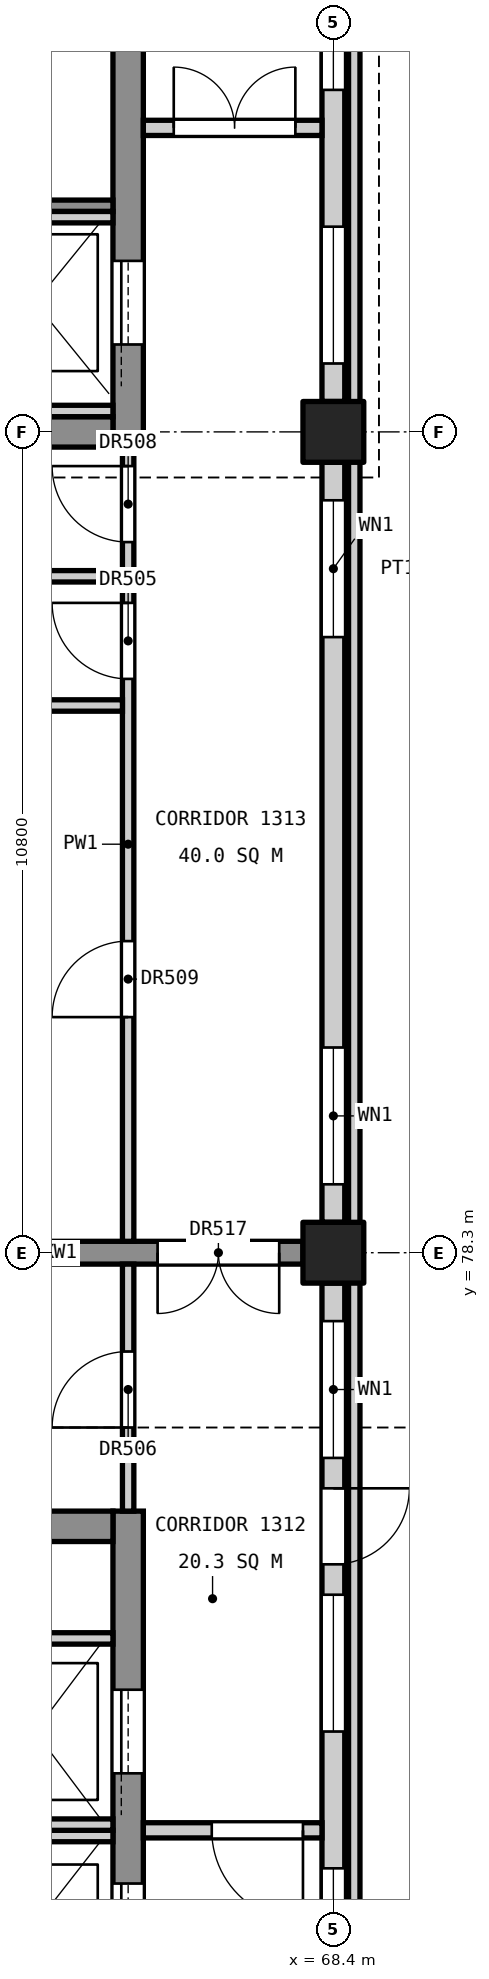
"""IFC4 building model, lengths in metres.
Left out: names, types, materials, properties, quantities, classifications, styles, units other than length and angle.
Written with IfcOpenShell. Run it as: python <this file> out.ifc"""

import sys

from ifc_helpers import new_model, si_unit, direction, frame, frame_2d, origin, origin_2d, place, context, subcontext, project, spatial, rectangle, extrude, element, fill, save


model = new_model("IFC4")
c1 = context("Model", 3, precision=1e-05, world=origin(), true_north=direction((0.0, 1.0)))
c2 = subcontext(c1, "Body", "Model", "MODEL_VIEW")
j1 = project(units=[si_unit("LENGTHUNIT", "METRE"), si_unit("PLANEANGLEUNIT", "RADIAN")], contexts=[c1])
p1 = place(None, origin())
s1 = spatial("IfcSite", under=j1, at=p1, CompositionType="ELEMENT")
p2 = place(p1, origin())
s2 = spatial("IfcBuilding", under=s1, at=p2, CompositionType="ELEMENT")
p3 = place(p2, frame((0.0, 0.0, 65.4)))
s3 = spatial("IfcBuildingStorey", under=s2, at=p3, CompositionType="ELEMENT", Elevation=65.4)
for number, where, z_axis, x_axis in (
    (1, (68.4, 78.3, 0.0), (0.0, 0.0, 1.0), (1.0, 0.0, 0.0)),
    (2, (68.4, 89.1, 0.0), (0.0, 0.0, 1.0), (1.0, 0.0, 0.0)),
):
    element("IfcColumn", number, at=place(p3, frame(where, z_axis=z_axis, x_axis=x_axis)), inside=s3, PredefinedType="COLUMN", context=c2, shape_type="SweptSolid", body=[
        extrude(rectangle(XDim=0.8, YDim=0.8, at=origin_2d()), origin(), (0.0, 0.0, 1.0), 4.8),
    ])
p4 = place(p3, frame((65.7, 60.1, 0.0), z_axis=(0.0, 0.0, 1.0), x_axis=(0.0, 1.0, 0.0)))
e3 = element("IfcWall", 3, at=p4, inside=s3, PredefinedType="SHEAR", context=c2, shape_type="SweptSolid", body=[
    extrude(rectangle(XDim=14.8, YDim=0.4, at=frame_2d((7.4, 0.0))), origin(), (0.0, 0.0, 1.0), 4.55),
])
p5 = place(p4, frame((0.5, 0.0, 0.0)))
e4 = element("IfcOpeningElement", 4, at=p5, cuts=e3, PredefinedType="OPENING", context=c2, shape_type="SweptSolid", body=[
    extrude(rectangle(XDim=1.4, YDim=2.1, at=frame_2d((0.7, 1.05))), frame((0.0, 0.21, 0.0), z_axis=(0.0, -1.0, 0.0), x_axis=(1.0, 0.0, 0.0)), (0.0, 0.0, 1.0), 0.42),
])
p6 = place(p4, frame((8.8, 0.0, 0.0)))
e5 = element("IfcOpeningElement", 5, at=p6, cuts=e3, PredefinedType="OPENING", context=c2, shape_type="SweptSolid", body=[
    extrude(rectangle(XDim=1.1, YDim=2.1, at=frame_2d((0.55, 1.05))), frame((0.0, 0.21, 0.0), z_axis=(0.0, -1.0, 0.0), x_axis=(1.0, 0.0, 0.0)), (0.0, 0.0, 1.0), 0.42),
])
p7 = place(p4, frame((11.35, 0.0, 0.0)))
e6 = element("IfcOpeningElement", 6, at=p7, cuts=e3, PredefinedType="OPENING", context=c2, shape_type="SweptSolid", body=[
    extrude(rectangle(XDim=1.1, YDim=2.1, at=frame_2d((0.55, 1.05))), frame((0.0, 0.21, 0.0), z_axis=(0.0, -1.0, 0.0), x_axis=(1.0, 0.0, 0.0)), (0.0, 0.0, 1.0), 0.42),
])
p8 = place(p3, frame((61.4, 74.7, 0.0), z_axis=(0.0, 0.0, 1.0), x_axis=(1.0, 0.0, 0.0)))
e7 = element("IfcWall", 7, at=p8, inside=s3, PredefinedType="SHEAR", context=c2, shape_type="SweptSolid", body=[
    extrude(rectangle(XDim=4.1, YDim=0.4, at=frame_2d((2.05, 0.0))), origin(), (0.0, 0.0, 1.0), 4.55),
])
p9 = place(p3, frame((65.7, 88.9, 0.0), z_axis=(0.0, 0.0, 1.0), x_axis=(0.0, 1.0, 0.0)))
e8 = element("IfcWall", 8, at=p9, inside=s3, PredefinedType="SHEAR", context=c2, shape_type="SweptSolid", body=[
    extrude(rectangle(XDim=11.2, YDim=0.4, at=frame_2d((5.6, 0.0))), origin(), (0.0, 0.0, 1.0), 4.55),
])
p10 = place(p9, frame((9.3, 0.0, 0.0)))
e9 = element("IfcOpeningElement", 9, at=p10, cuts=e8, PredefinedType="OPENING", context=c2, shape_type="SweptSolid", body=[
    extrude(rectangle(XDim=1.4, YDim=2.1, at=frame_2d((0.7, 1.05))), frame((0.0, 0.21, 0.0), z_axis=(0.0, -1.0, 0.0), x_axis=(1.0, 0.0, 0.0)), (0.0, 0.0, 1.0), 0.42),
])
p11 = place(p9, frame((1.35, 0.0, 0.0)))
e10 = element("IfcOpeningElement", 10, at=p11, cuts=e8, PredefinedType="OPENING", context=c2, shape_type="SweptSolid", body=[
    extrude(rectangle(XDim=1.1, YDim=2.1, at=frame_2d((0.55, 1.05))), frame((0.0, 0.21, 0.0), z_axis=(0.0, -1.0, 0.0), x_axis=(1.0, 0.0, 0.0)), (0.0, 0.0, 1.0), 0.42),
])
p12 = place(p3, frame((61.4, 89.1, 0.0), z_axis=(0.0, 0.0, 1.0), x_axis=(1.0, 0.0, 0.0)))
e11 = element("IfcWall", 11, at=p12, inside=s3, PredefinedType="SHEAR", context=c2, shape_type="SweptSolid", body=[
    extrude(rectangle(XDim=4.1, YDim=0.4, at=frame_2d((2.05, 0.0))), origin(), (0.0, 0.0, 1.0), 4.55),
])
p13 = place(p3, frame((61.6, 78.3, 0.0), z_axis=(0.0, 0.0, 1.0), x_axis=(1.0, 0.0, 0.0)))
e12 = element("IfcWall", 12, at=p13, inside=s3, PredefinedType="SHEAR", context=c2, shape_type="SweptSolid", body=[
    extrude(rectangle(XDim=6.4, YDim=0.3, at=frame_2d((3.2, 0.0))), origin(), (0.0, 0.0, 1.0), 4.55),
])
p14 = place(p13, frame((4.488, 0.0, 0.0)))
e13 = element("IfcOpeningElement", 13, at=p14, cuts=e12, PredefinedType="OPENING", context=c2, shape_type="SweptSolid", body=[
    extrude(rectangle(XDim=1.6, YDim=2.1, at=frame_2d((0.8, 1.05))), frame((0.0, 0.16, 0.0), z_axis=(0.0, -1.0, 0.0), x_axis=(1.0, 0.0, 0.0)), (0.0, 0.0, 1.0), 0.32),
])
p15 = place(p3, frame((61.4, 92.075, 0.0), z_axis=(0.0, 0.0, 1.0), x_axis=(1.0, 0.0, 0.0)))
e14 = element("IfcWall", 14, at=p15, inside=s3, PredefinedType="SOLIDWALL", context=c2, shape_type="SweptSolid", body=[
    extrude(rectangle(XDim=4.1, YDim=0.15, at=frame_2d((2.05, 0.0))), origin(), (0.0, 0.0, 1.0), 4.55),
])
for number, where, z_axis, x_axis in (
    (15, (63.65, 70.625, 0.0), (0.0, 0.0, 1.0), (1.0, 0.0, 0.0)),
    (16, (63.65, 70.775, 0.0), (0.0, 0.0, 1.0), (1.0, 0.0, 0.0)),
    (17, (63.65, 73.225, 0.0), (0.0, 0.0, 1.0), (1.0, 0.0, 0.0)),
    (18, (63.65, 91.925, 0.0), (0.0, 0.0, 1.0), (1.0, 0.0, 0.0)),
    (19, (63.65, 89.375, 0.0), (0.0, 0.0, 1.0), (1.0, 0.0, 0.0)),
):
    element("IfcWall", number, at=place(p3, frame(where, z_axis=z_axis, x_axis=x_axis)), inside=s3, PredefinedType="SOLIDWALL", context=c2, shape_type="SweptSolid", body=[
        extrude(rectangle(XDim=1.85, YDim=0.15, at=frame_2d((0.925, 0.0))), origin(), (0.0, 0.0, 1.0), 4.8),
    ])
p16 = place(p3, frame((68.675, 35.05, 0.0), z_axis=(0.0, 0.0, 1.0), x_axis=(0.0, 1.0, 0.0)))
e20 = element("IfcWall", 20, at=p16, inside=s3, PredefinedType="PARAPET", context=c2, shape_type="SweptSolid", body=[
    extrude(rectangle(XDim=64.9, YDim=0.15, at=frame_2d((32.45, 0.0))), origin(), (0.0, 0.0, 1.0), 0.3),
])
p17 = place(p3, frame((68.4, 67.9, 0.0), z_axis=(0.0, 0.0, 1.0), x_axis=(0.0, 1.0, 0.0)))
e21 = element("IfcWall", 21, at=p17, inside=s3, PredefinedType="STANDARD", context=c2, shape_type="SweptSolid", body=[
    extrude(rectangle(XDim=10.0, YDim=0.3, at=frame_2d((5.0, 0.0))), origin(), (0.0, 0.0, 1.0), 3.55),
])
p18 = place(p17, frame((0.5, 0.0, 0.9)))
e22 = element("IfcOpeningElement", 22, at=p18, cuts=e21, PredefinedType="OPENING", context=c2, shape_type="SweptSolid", body=[
    extrude(rectangle(XDim=1.8, YDim=2.4, at=frame_2d((0.9, 1.2))), frame((0.0, 0.16, 0.0), z_axis=(0.0, -1.0, 0.0), x_axis=(1.0, 0.0, 0.0)), (0.0, 0.0, 1.0), 0.32),
])
p19 = place(p17, frame((4.1, 0.0, 0.9)))
e23 = element("IfcOpeningElement", 23, at=p19, cuts=e21, PredefinedType="OPENING", context=c2, shape_type="SweptSolid", body=[
    extrude(rectangle(XDim=1.8, YDim=2.4, at=frame_2d((0.9, 1.2))), frame((0.0, 0.16, 0.0), z_axis=(0.0, -1.0, 0.0), x_axis=(1.0, 0.0, 0.0)), (0.0, 0.0, 1.0), 0.32),
])
p20 = place(p17, frame((7.7, 0.0, 0.9)))
e24 = element("IfcOpeningElement", 24, at=p20, cuts=e21, PredefinedType="OPENING", context=c2, shape_type="SweptSolid", body=[
    extrude(rectangle(XDim=1.8, YDim=2.4, at=frame_2d((0.9, 1.2))), frame((0.0, 0.16, 0.0), z_axis=(0.0, -1.0, 0.0), x_axis=(1.0, 0.0, 0.0)), (0.0, 0.0, 1.0), 0.32),
])
p21 = place(p17, frame((6.3, 0.0, 0.0)))
e25 = element("IfcOpeningElement", 25, at=p21, cuts=e21, PredefinedType="OPENING", context=c2, shape_type="SweptSolid", body=[
    extrude(rectangle(XDim=1.0, YDim=2.1, at=frame_2d((0.5, 1.05))), frame((0.0, 0.16, 0.0), z_axis=(0.0, -1.0, 0.0), x_axis=(1.0, 0.0, 0.0)), (0.0, 0.0, 1.0), 0.32),
])
p22 = place(p3, frame((68.4, 78.7, 0.0), z_axis=(0.0, 0.0, 1.0), x_axis=(0.0, 1.0, 0.0)))
e26 = element("IfcWall", 26, at=p22, inside=s3, PredefinedType="STANDARD", context=c2, shape_type="SweptSolid", body=[
    extrude(rectangle(XDim=10.0, YDim=0.3, at=frame_2d((5.0, 0.0))), origin(), (0.0, 0.0, 1.0), 3.55),
])
p23 = place(p22, frame((0.5, 0.0, 0.9)))
e27 = element("IfcOpeningElement", 27, at=p23, cuts=e26, PredefinedType="OPENING", context=c2, shape_type="SweptSolid", body=[
    extrude(rectangle(XDim=1.8, YDim=2.4, at=frame_2d((0.9, 1.2))), frame((0.0, 0.16, 0.0), z_axis=(0.0, -1.0, 0.0), x_axis=(1.0, 0.0, 0.0)), (0.0, 0.0, 1.0), 0.32),
])
p24 = place(p22, frame((7.7, 0.0, 0.9)))
e28 = element("IfcOpeningElement", 28, at=p24, cuts=e26, PredefinedType="OPENING", context=c2, shape_type="SweptSolid", body=[
    extrude(rectangle(XDim=1.8, YDim=2.4, at=frame_2d((0.9, 1.2))), frame((0.0, 0.16, 0.0), z_axis=(0.0, -1.0, 0.0), x_axis=(1.0, 0.0, 0.0)), (0.0, 0.0, 1.0), 0.32),
])
p25 = place(p3, frame((68.4, 89.5, 0.0), z_axis=(0.0, 0.0, 1.0), x_axis=(0.0, 1.0, 0.0)))
e29 = element("IfcWall", 29, at=p25, inside=s3, PredefinedType="STANDARD", context=c2, shape_type="SweptSolid", body=[
    extrude(rectangle(XDim=10.0, YDim=0.3, at=frame_2d((5.0, 0.0))), origin(), (0.0, 0.0, 1.0), 3.55),
])
p26 = place(p25, frame((0.5, 0.0, 0.9)))
e30 = element("IfcOpeningElement", 30, at=p26, cuts=e29, PredefinedType="OPENING", context=c2, shape_type="SweptSolid", body=[
    extrude(rectangle(XDim=1.8, YDim=2.4, at=frame_2d((0.9, 1.2))), frame((0.0, 0.16, 0.0), z_axis=(0.0, -1.0, 0.0), x_axis=(1.0, 0.0, 0.0)), (0.0, 0.0, 1.0), 0.32),
])
p27 = place(p25, frame((4.1, 0.0, 0.9)))
e31 = element("IfcOpeningElement", 31, at=p27, cuts=e29, PredefinedType="OPENING", context=c2, shape_type="SweptSolid", body=[
    extrude(rectangle(XDim=1.8, YDim=2.4, at=frame_2d((0.9, 1.2))), frame((0.0, 0.16, 0.0), z_axis=(0.0, -1.0, 0.0), x_axis=(1.0, 0.0, 0.0)), (0.0, 0.0, 1.0), 0.32),
])
p28 = place(p25, frame((7.7, 0.0, 0.9)))
e32 = element("IfcOpeningElement", 32, at=p28, cuts=e29, PredefinedType="OPENING", context=c2, shape_type="SweptSolid", body=[
    extrude(rectangle(XDim=1.8, YDim=2.4, at=frame_2d((0.9, 1.2))), frame((0.0, 0.16, 0.0), z_axis=(0.0, -1.0, 0.0), x_axis=(1.0, 0.0, 0.0)), (0.0, 0.0, 1.0), 0.32),
])
p29 = place(p3, frame((65.7, 74.9, 0.0), z_axis=(0.0, 0.0, 1.0), x_axis=(0.0, 1.0, 0.0)))
e33 = element("IfcWall", 33, at=p29, inside=s3, PredefinedType="PARTITIONING", context=c2, shape_type="SweptSolid", body=[
    extrude(rectangle(XDim=3.25, YDim=0.15, at=frame_2d((1.625, 0.0))), origin(), (0.0, 0.0, 1.0), 3.55),
])
p30 = place(p29, frame((1.1, 0.0, 0.0)))
e34 = element("IfcOpeningElement", 34, at=p30, cuts=e33, PredefinedType="OPENING", context=c2, shape_type="SweptSolid", body=[
    extrude(rectangle(XDim=1.0, YDim=2.1, at=frame_2d((0.5, 1.05))), frame((0.0, 0.085, 0.0), z_axis=(0.0, -1.0, 0.0), x_axis=(1.0, 0.0, 0.0)), (0.0, 0.0, 1.0), 0.17),
])
p31 = place(p3, frame((65.7, 78.45, 0.0), z_axis=(0.0, 0.0, 1.0), x_axis=(0.0, 1.0, 0.0)))
e35 = element("IfcWall", 35, at=p31, inside=s3, PredefinedType="PARTITIONING", context=c2, shape_type="SweptSolid", body=[
    extrude(rectangle(XDim=10.45, YDim=0.15, at=frame_2d((5.225, 0.0))), origin(), (0.0, 0.0, 1.0), 3.55),
])
p32 = place(p31, frame((7.4, 0.0, 0.0)))
e36 = element("IfcOpeningElement", 36, at=p32, cuts=e35, PredefinedType="OPENING", context=c2, shape_type="SweptSolid", body=[
    extrude(rectangle(XDim=1.0, YDim=2.1, at=frame_2d((0.5, 1.05))), frame((0.0, 0.085, 0.0), z_axis=(0.0, -1.0, 0.0), x_axis=(1.0, 0.0, 0.0)), (0.0, 0.0, 1.0), 0.17),
])
p33 = place(p31, frame((9.2, 0.0, 0.0)))
e37 = element("IfcOpeningElement", 37, at=p33, cuts=e35, PredefinedType="OPENING", context=c2, shape_type="SweptSolid", body=[
    extrude(rectangle(XDim=1.0, YDim=2.1, at=frame_2d((0.5, 1.05))), frame((0.0, 0.085, 0.0), z_axis=(0.0, -1.0, 0.0), x_axis=(1.0, 0.0, 0.0)), (0.0, 0.0, 1.0), 0.17),
])
p34 = place(p31, frame((2.95, 0.0, 0.0)))
e38 = element("IfcOpeningElement", 38, at=p34, cuts=e35, PredefinedType="OPENING", context=c2, shape_type="SweptSolid", body=[
    extrude(rectangle(XDim=1.0, YDim=2.1, at=frame_2d((0.5, 1.05))), frame((0.0, 0.085, 0.0), z_axis=(0.0, -1.0, 0.0), x_axis=(1.0, 0.0, 0.0)), (0.0, 0.0, 1.0), 0.17),
])
p35 = place(p3, frame((61.35, 85.5, 0.0), z_axis=(0.0, 0.0, 1.0), x_axis=(1.0, 0.0, 0.0)))
e39 = element("IfcWall", 39, at=p35, inside=s3, PredefinedType="PARTITIONING", context=c2, shape_type="SweptSolid", body=[
    extrude(rectangle(XDim=4.275, YDim=0.15, at=frame_2d((2.137, 0.0))), origin(), (0.0, 0.0, 1.0), 3.85),
])
p36 = place(p3, frame((61.35, 87.2, 0.0), z_axis=(0.0, 0.0, 1.0), x_axis=(1.0, 0.0, 0.0)))
e40 = element("IfcWall", 40, at=p36, inside=s3, PredefinedType="PARTITIONING", context=c2, shape_type="SweptSolid", body=[
    extrude(rectangle(XDim=4.275, YDim=0.15, at=frame_2d((2.137, 0.0))), origin(), (0.0, 0.0, 1.0), 3.55),
])
p37 = place(p3, frame((65.9, 93.1, 0.0), z_axis=(0.0, 0.0, 1.0), x_axis=(1.0, 0.0, 0.0)))
e41 = element("IfcWall", 41, at=p37, inside=s3, PredefinedType="PARTITIONING", context=c2, shape_type="SweptSolid", body=[
    extrude(rectangle(XDim=2.35, YDim=0.2, at=frame_2d((1.175, 0.0))), origin(), (0.0, 0.0, 1.0), 3.55),
])
p38 = place(p37, frame((0.4, 0.0, 0.0)))
e42 = element("IfcOpeningElement", 42, at=p38, cuts=e41, PredefinedType="OPENING", context=c2, shape_type="SweptSolid", body=[
    extrude(rectangle(XDim=1.6, YDim=2.1, at=frame_2d((0.8, 1.05))), frame((0.0, 0.11, 0.0), z_axis=(0.0, -1.0, 0.0), x_axis=(1.0, 0.0, 0.0)), (0.0, 0.0, 1.0), 0.22),
])
p39 = place(p3, frame((65.9, 70.7, 0.0), z_axis=(0.0, 0.0, 1.0), x_axis=(1.0, 0.0, 0.0)))
e43 = element("IfcWall", 43, at=p39, inside=s3, PredefinedType="PARTITIONING", context=c2, shape_type="SweptSolid", body=[
    extrude(rectangle(XDim=2.35, YDim=0.2, at=frame_2d((1.175, 0.0))), origin(), (0.0, 0.0, 1.0), 3.55),
])
p40 = place(p39, frame((0.9, 0.0, 0.0)))
e44 = element("IfcOpeningElement", 44, at=p40, cuts=e43, PredefinedType="OPENING", context=c2, shape_type="SweptSolid", body=[
    extrude(rectangle(XDim=1.2, YDim=2.1, at=frame_2d((0.6, 1.05))), frame((0.0, 0.11, 0.0), z_axis=(0.0, -1.0, 0.0), x_axis=(1.0, 0.0, 0.0)), (0.0, 0.0, 1.0), 0.22),
])
p41 = place(p6, origin())
e45 = element("IfcDoor", 45, at=p41, inside=s3, OperationType="SLIDING_TO_LEFT", PredefinedType="DOOR", context=c2, shape_type="SweptSolid", body=[
    extrude(rectangle(XDim=1.1, YDim=2.1, at=frame_2d((0.55, 1.05))), frame((0.0, 0.025, 0.0), z_axis=(0.0, -1.0, 0.0), x_axis=(1.0, 0.0, 0.0)), (0.0, 0.0, 1.0), 0.05),
])
fill(e5, e45)
p42 = place(p7, origin())
e46 = element("IfcDoor", 46, at=p42, inside=s3, OperationType="SLIDING_TO_LEFT", PredefinedType="DOOR", context=c2, shape_type="SweptSolid", body=[
    extrude(rectangle(XDim=1.1, YDim=2.1, at=frame_2d((0.55, 1.05))), frame((0.0, 0.025, 0.0), z_axis=(0.0, -1.0, 0.0), x_axis=(1.0, 0.0, 0.0)), (0.0, 0.0, 1.0), 0.05),
])
fill(e6, e46)
p43 = place(p11, origin())
e47 = element("IfcDoor", 47, at=p43, inside=s3, OperationType="SLIDING_TO_LEFT", PredefinedType="DOOR", context=c2, shape_type="SweptSolid", body=[
    extrude(rectangle(XDim=1.1, YDim=2.1, at=frame_2d((0.55, 1.05))), frame((0.0, 0.025, 0.0), z_axis=(0.0, -1.0, 0.0), x_axis=(1.0, 0.0, 0.0)), (0.0, 0.0, 1.0), 0.05),
])
fill(e10, e47)
p44 = place(p18, origin())
e48 = element("IfcWindow", 48, at=p44, inside=s3, PartitioningType="SINGLE_PANEL", PredefinedType="WINDOW", context=c2, shape_type="SweptSolid", body=[
    extrude(rectangle(XDim=1.8, YDim=2.4, at=frame_2d((0.9, 1.2))), frame((0.0, 0.03, 0.0), z_axis=(0.0, -1.0, 0.0), x_axis=(1.0, 0.0, 0.0)), (0.0, 0.0, 1.0), 0.06),
])
fill(e22, e48)
p45 = place(p19, origin())
e49 = element("IfcWindow", 49, at=p45, inside=s3, PartitioningType="SINGLE_PANEL", PredefinedType="WINDOW", context=c2, shape_type="SweptSolid", body=[
    extrude(rectangle(XDim=1.8, YDim=2.4, at=frame_2d((0.9, 1.2))), frame((0.0, 0.03, 0.0), z_axis=(0.0, -1.0, 0.0), x_axis=(1.0, 0.0, 0.0)), (0.0, 0.0, 1.0), 0.06),
])
fill(e23, e49)
p46 = place(p20, origin())
e50 = element("IfcWindow", 50, at=p46, inside=s3, PartitioningType="SINGLE_PANEL", PredefinedType="WINDOW", context=c2, shape_type="SweptSolid", body=[
    extrude(rectangle(XDim=1.8, YDim=2.4, at=frame_2d((0.9, 1.2))), frame((0.0, 0.03, 0.0), z_axis=(0.0, -1.0, 0.0), x_axis=(1.0, 0.0, 0.0)), (0.0, 0.0, 1.0), 0.06),
])
fill(e24, e50)
p47 = place(p23, origin())
e51 = element("IfcWindow", 51, at=p47, inside=s3, PartitioningType="SINGLE_PANEL", PredefinedType="WINDOW", context=c2, shape_type="SweptSolid", body=[
    extrude(rectangle(XDim=1.8, YDim=2.4, at=frame_2d((0.9, 1.2))), frame((0.0, 0.03, 0.0), z_axis=(0.0, -1.0, 0.0), x_axis=(1.0, 0.0, 0.0)), (0.0, 0.0, 1.0), 0.06),
])
fill(e27, e51)
p48 = place(p24, origin())
e52 = element("IfcWindow", 52, at=p48, inside=s3, PartitioningType="SINGLE_PANEL", PredefinedType="WINDOW", context=c2, shape_type="SweptSolid", body=[
    extrude(rectangle(XDim=1.8, YDim=2.4, at=frame_2d((0.9, 1.2))), frame((0.0, 0.03, 0.0), z_axis=(0.0, -1.0, 0.0), x_axis=(1.0, 0.0, 0.0)), (0.0, 0.0, 1.0), 0.06),
])
fill(e28, e52)
p49 = place(p26, origin())
e53 = element("IfcWindow", 53, at=p49, inside=s3, PartitioningType="SINGLE_PANEL", PredefinedType="WINDOW", context=c2, shape_type="SweptSolid", body=[
    extrude(rectangle(XDim=1.8, YDim=2.4, at=frame_2d((0.9, 1.2))), frame((0.0, 0.03, 0.0), z_axis=(0.0, -1.0, 0.0), x_axis=(1.0, 0.0, 0.0)), (0.0, 0.0, 1.0), 0.06),
])
fill(e30, e53)
p50 = place(p27, origin())
e54 = element("IfcWindow", 54, at=p50, inside=s3, PartitioningType="SINGLE_PANEL", PredefinedType="WINDOW", context=c2, shape_type="SweptSolid", body=[
    extrude(rectangle(XDim=1.8, YDim=2.4, at=frame_2d((0.9, 1.2))), frame((0.0, 0.03, 0.0), z_axis=(0.0, -1.0, 0.0), x_axis=(1.0, 0.0, 0.0)), (0.0, 0.0, 1.0), 0.06),
])
fill(e31, e54)
p51 = place(p21, frame((1.0, 0.0, 0.0), z_axis=(0.0, 0.0, 1.0), x_axis=(-1.0, 0.0, 0.0)))
e55 = element("IfcDoor", 55, at=p51, inside=s3, OperationType="SINGLE_SWING_LEFT", PredefinedType="DOOR", context=c2, shape_type="SweptSolid", body=[
    extrude(rectangle(XDim=1.0, YDim=2.1, at=frame_2d((0.5, 1.05))), frame((0.0, 0.025, 0.0), z_axis=(0.0, -1.0, 0.0), x_axis=(1.0, 0.0, 0.0)), (0.0, 0.0, 1.0), 0.05),
])
fill(e25, e55)
p52 = place(p32, origin())
e56 = element("IfcDoor", 56, at=p52, inside=s3, OperationType="SINGLE_SWING_RIGHT", PredefinedType="DOOR", context=c2, shape_type="SweptSolid", body=[
    extrude(rectangle(XDim=1.0, YDim=2.1, at=frame_2d((0.5, 1.05))), frame((0.0, 0.025, 0.0), z_axis=(0.0, -1.0, 0.0), x_axis=(1.0, 0.0, 0.0)), (0.0, 0.0, 1.0), 0.05),
])
fill(e36, e56)
p53 = place(p30, origin())
e57 = element("IfcDoor", 57, at=p53, inside=s3, OperationType="SINGLE_SWING_LEFT", PredefinedType="DOOR", context=c2, shape_type="SweptSolid", body=[
    extrude(rectangle(XDim=1.0, YDim=2.1, at=frame_2d((0.5, 1.05))), frame((0.0, 0.025, 0.0), z_axis=(0.0, -1.0, 0.0), x_axis=(1.0, 0.0, 0.0)), (0.0, 0.0, 1.0), 0.05),
])
fill(e34, e57)
p54 = place(p33, origin())
e58 = element("IfcDoor", 58, at=p54, inside=s3, OperationType="SINGLE_SWING_RIGHT", PredefinedType="DOOR", context=c2, shape_type="SweptSolid", body=[
    extrude(rectangle(XDim=1.0, YDim=2.1, at=frame_2d((0.5, 1.05))), frame((0.0, 0.025, 0.0), z_axis=(0.0, -1.0, 0.0), x_axis=(1.0, 0.0, 0.0)), (0.0, 0.0, 1.0), 0.05),
])
fill(e37, e58)
p55 = place(p34, origin())
e59 = element("IfcDoor", 59, at=p55, inside=s3, OperationType="SINGLE_SWING_LEFT", PredefinedType="DOOR", context=c2, shape_type="SweptSolid", body=[
    extrude(rectangle(XDim=1.0, YDim=2.1, at=frame_2d((0.5, 1.05))), frame((0.0, 0.025, 0.0), z_axis=(0.0, -1.0, 0.0), x_axis=(1.0, 0.0, 0.0)), (0.0, 0.0, 1.0), 0.05),
])
fill(e38, e59)
p56 = place(p40, frame((1.2, 0.0, 0.0), z_axis=(0.0, 0.0, 1.0), x_axis=(-1.0, 0.0, 0.0)))
e60 = element("IfcDoor", 60, at=p56, inside=s3, OperationType="SINGLE_SWING_LEFT", PredefinedType="DOOR", context=c2, shape_type="SweptSolid", body=[
    extrude(rectangle(XDim=1.2, YDim=2.1, at=frame_2d((0.6, 1.05))), frame((0.0, 0.025, 0.0), z_axis=(0.0, -1.0, 0.0), x_axis=(1.0, 0.0, 0.0)), (0.0, 0.0, 1.0), 0.05),
])
fill(e44, e60)
p57 = place(p38, origin())
e61 = element("IfcDoor", 61, at=p57, inside=s3, OperationType="DOUBLE_DOOR_SINGLE_SWING", PredefinedType="DOOR", context=c2, shape_type="SweptSolid", body=[
    extrude(rectangle(XDim=1.6, YDim=2.1, at=frame_2d((0.8, 1.05))), frame((0.0, 0.025, 0.0), z_axis=(0.0, -1.0, 0.0), x_axis=(1.0, 0.0, 0.0)), (0.0, 0.0, 1.0), 0.05),
])
fill(e42, e61)
p58 = place(p14, frame((1.6, 0.0, 0.0), z_axis=(0.0, 0.0, 1.0), x_axis=(-1.0, 0.0, 0.0)))
e62 = element("IfcDoor", 62, at=p58, inside=s3, OperationType="DOUBLE_DOOR_SINGLE_SWING", PredefinedType="DOOR", context=c2, shape_type="SweptSolid", body=[
    extrude(rectangle(XDim=1.6, YDim=2.1, at=frame_2d((0.8, 1.05))), frame((0.0, 0.025, 0.0), z_axis=(0.0, -1.0, 0.0), x_axis=(1.0, 0.0, 0.0)), (0.0, 0.0, 1.0), 0.05),
])
fill(e13, e62)
save(model, sys.argv[1])
